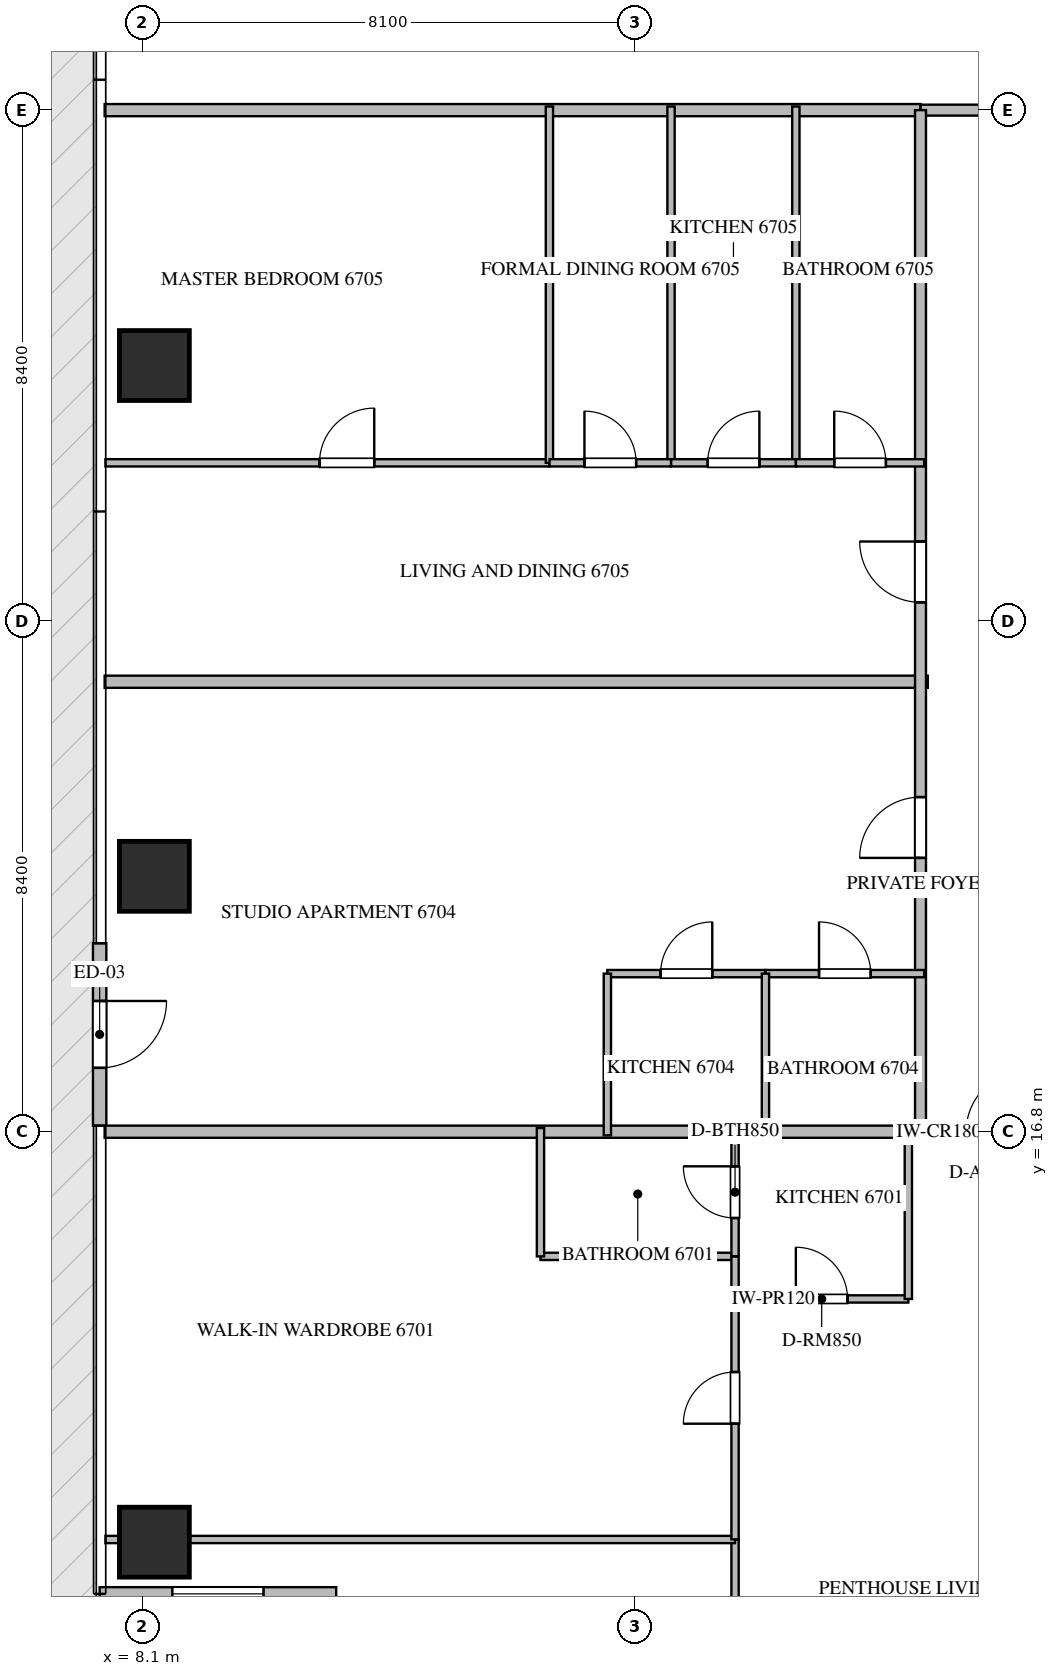
"""IFC4 building model, lengths in metres.
Left out: names, types, materials, properties, quantities, classifications, styles, units other than length and angle.
Written with IfcOpenShell. Run it as: python <this file> out.ifc"""

import sys

from ifc_helpers import new_model, si_unit, direction, frame, frame_2d, origin, origin_2d, place, context, subcontext, project, spatial, rectangle, extrude, source, transform, mapped, element, fill, save


model = new_model("IFC4")
c1 = context("Model", 3, precision=1e-05, world=origin(), true_north=direction((0.0, 1.0)))
c2 = subcontext(c1, "Body", "Model", "MODEL_VIEW")
j1 = project(units=[si_unit("LENGTHUNIT", "METRE"), si_unit("PLANEANGLEUNIT", "RADIAN")], contexts=[c1])
p1 = place(None, origin())
s1 = spatial("IfcSite", under=j1, at=p1, CompositionType="ELEMENT")
p2 = place(p1, origin())
s2 = spatial("IfcBuilding", under=s1, at=p2, CompositionType="ELEMENT")
p3 = place(p2, frame((0.0, 0.0, 268.2)))
s3 = spatial("IfcBuildingStorey", under=s2, at=p3, CompositionType="ELEMENT", Elevation=268.2)
m1 = source(origin(), c2, "Body", "SweptSolid", [
    extrude(rectangle(XDim=1.15, YDim=1.15, at=origin_2d()), origin(), (0.0, 0.0, 1.0), 3.85),
])
for number, where, z_axis, x_axis in (
    (1, (8.3, 10.05, -0.26), (0.0, 0.0, 1.0), (1.0, 0.0, 0.0)),
    (2, (8.3, 21.0, -0.26), (0.0, 0.0, 1.0), (1.0, 0.0, 0.0)),
    (3, (8.3, 29.4, -0.26), (0.0, 0.0, 1.0), (1.0, 0.0, 0.0)),
):
    element("IfcColumn", number, at=place(p3, frame(where, z_axis=z_axis, x_axis=x_axis)), inside=s3, PredefinedType="COLUMN", context=c2, shape_type="MappedRepresentation", body=[
        mapped(m1, transform((0.0, 0.0, 0.0), scale=1.0)),
    ])
p4 = place(p3, frame((7.4, 19.9, 0.0), z_axis=(0.0, 0.0, 1.0), x_axis=(0.0, -1.0, 0.0)))
e4 = element("IfcWall", 4, at=p4, inside=s3, PredefinedType="ELEMENTEDWALL", context=c2, shape_type="SweptSolid", body=[
    extrude(rectangle(XDim=3.0, YDim=0.22, at=frame_2d((1.5, 0.0))), origin(), (0.0, 0.0, 1.0), 3.575),
])
p5 = place(p4, frame((0.95, 0.0, 0.0)))
e5 = element("IfcOpeningElement", 5, at=p5, cuts=e4, PredefinedType="OPENING", context=c2, shape_type="SweptSolid", body=[
    extrude(rectangle(XDim=1.1, YDim=2.2, at=frame_2d((0.55, 1.1))), frame((0.0, 0.12, 0.0), z_axis=(0.0, -1.0, 0.0), x_axis=(1.0, 0.0, 0.0)), (0.0, 0.0, 1.0), 0.24),
])
p6 = place(p3, frame((7.4, 9.2, 0.0), z_axis=(0.0, 0.0, 1.0), x_axis=(1.0, 0.0, 0.0)))
e6 = element("IfcWall", 6, at=p6, inside=s3, PredefinedType="ELEMENTEDWALL", context=c2, shape_type="SweptSolid", body=[
    extrude(rectangle(XDim=3.89, YDim=0.22, at=frame_2d((1.945, 0.0))), origin(), (0.0, 0.0, 1.0), 3.575),
])
p7 = place(p6, frame((1.195, 0.0, 0.65)))
e7 = element("IfcOpeningElement", 7, at=p7, cuts=e6, PredefinedType="OPENING", context=c2, shape_type="SweptSolid", body=[
    extrude(rectangle(XDim=1.5, YDim=2.25, at=frame_2d((0.75, 1.125))), frame((0.0, 0.12, 0.0), z_axis=(0.0, -1.0, 0.0), x_axis=(1.0, 0.0, 0.0)), (0.0, 0.0, 1.0), 0.24),
])
p8 = place(p3, frame((7.482, 24.2, 0.0), z_axis=(0.0, 0.0, 1.0), x_axis=(1.0, 0.0, 0.0)))
e8 = element("IfcWall", 8, at=p8, inside=s3, PredefinedType="PARTITIONING", context=c2, shape_type="SweptSolid", body=[
    extrude(rectangle(XDim=13.538, YDim=0.2, at=frame_2d((6.769, 0.0))), origin(), (0.0, 0.0, 1.0), 3.59),
])
for number, where, z_axis, x_axis in (
    (9, (7.482, 16.8, 0.0), (0.0, 0.0, 1.0), (1.0, 0.0, 0.0)),
    (10, (7.482, 33.6, 0.0), (0.0, 0.0, 1.0), (1.0, 0.0, 0.0)),
):
    element("IfcWall", number, at=place(p3, frame(where, z_axis=z_axis, x_axis=x_axis)), inside=s3, PredefinedType="PARTITIONING", context=c2, shape_type="SweptSolid", body=[
        extrude(rectangle(XDim=13.418, YDim=0.2, at=frame_2d((6.709, 0.0))), origin(), (0.0, 0.0, 1.0), 3.59),
    ])
p9 = place(p3, frame((20.902, 16.8, 0.0), z_axis=(0.0, 0.0, 1.0), x_axis=(1.0, 0.0, 0.0)))
e11 = element("IfcWall", 11, at=p9, inside=s3, PredefinedType="PARTITIONING", context=c2, shape_type="SweptSolid", body=[
    extrude(rectangle(XDim=2.496, YDim=0.18, at=frame_2d((1.248, 0.0))), origin(), (0.0, 0.0, 1.0), 3.59),
])
p10 = place(p9, frame((0.748, 0.0, 0.0)))
e12 = element("IfcOpeningElement", 12, at=p10, cuts=e11, PredefinedType="OPENING", context=c2, shape_type="SweptSolid", body=[
    extrude(rectangle(XDim=1.0, YDim=2.15, at=frame_2d((0.5, 1.075))), frame((0.0, 0.1, 0.0), z_axis=(0.0, -1.0, 0.0), x_axis=(1.0, 0.0, 0.0)), (0.0, 0.0, 1.0), 0.2),
])
p11 = place(p3, frame((20.902, 33.6, 0.0), z_axis=(0.0, 0.0, 1.0), x_axis=(1.0, 0.0, 0.0)))
e13 = element("IfcWall", 13, at=p11, inside=s3, PredefinedType="PARTITIONING", context=c2, shape_type="SweptSolid", body=[
    extrude(rectangle(XDim=2.496, YDim=0.18, at=frame_2d((1.248, 0.0))), origin(), (0.0, 0.0, 1.0), 3.59),
])
p12 = place(p3, frame((20.9, 16.8, 0.0), z_axis=(0.0, 0.0, 1.0), x_axis=(0.0, 1.0, 0.0)))
e14 = element("IfcWall", 14, at=p12, inside=s3, PredefinedType="PARTITIONING", context=c2, shape_type="SweptSolid", body=[
    extrude(rectangle(XDim=16.8, YDim=0.18, at=frame_2d((8.4, 0.0))), origin(), (0.0, 0.0, 1.0), 3.59),
])
p13 = place(p12, frame((4.503, 0.0, 0.0)))
e15 = element("IfcOpeningElement", 15, at=p13, cuts=e14, PredefinedType="OPENING", context=c2, shape_type="SweptSolid", body=[
    extrude(rectangle(XDim=1.0, YDim=2.15, at=frame_2d((0.5, 1.075))), frame((0.0, 0.1, 0.0), z_axis=(0.0, -1.0, 0.0), x_axis=(1.0, 0.0, 0.0)), (0.0, 0.0, 1.0), 0.2),
])
p14 = place(p12, frame((8.706, 0.0, 0.0)))
e16 = element("IfcOpeningElement", 16, at=p14, cuts=e14, PredefinedType="OPENING", context=c2, shape_type="SweptSolid", body=[
    extrude(rectangle(XDim=1.0, YDim=2.15, at=frame_2d((0.5, 1.075))), frame((0.0, 0.1, 0.0), z_axis=(0.0, -1.0, 0.0), x_axis=(1.0, 0.0, 0.0)), (0.0, 0.0, 1.0), 0.2),
])
p15 = place(p3, frame((17.85, 14.05, 0.0), z_axis=(0.0, 0.0, 1.0), x_axis=(1.0, 0.0, 0.0)))
e17 = element("IfcWall", 17, at=p15, inside=s3, PredefinedType="PARTITIONING", context=c2, shape_type="SweptSolid", body=[
    extrude(rectangle(XDim=2.85, YDim=0.12, at=frame_2d((1.425, 0.0))), origin(), (0.0, 0.0, 1.0), 3.59),
])
p16 = place(p15, frame((1.0, 0.0, 0.0)))
e18 = element("IfcOpeningElement", 18, at=p16, cuts=e17, PredefinedType="OPENING", context=c2, shape_type="SweptSolid", body=[
    extrude(rectangle(XDim=0.85, YDim=2.1, at=frame_2d((0.425, 1.05))), frame((0.0, 0.07, 0.0), z_axis=(0.0, -1.0, 0.0), x_axis=(1.0, 0.0, 0.0)), (0.0, 0.0, 1.0), 0.14),
])
p17 = place(p3, frame((20.7, 14.05, 0.0), z_axis=(0.0, 0.0, 1.0), x_axis=(0.0, 1.0, 0.0)))
e19 = element("IfcWall", 19, at=p17, inside=s3, PredefinedType="PARTITIONING", context=c2, shape_type="SweptSolid", body=[
    extrude(rectangle(XDim=2.81, YDim=0.12, at=frame_2d((1.405, 0.0))), origin(), (0.0, 0.0, 1.0), 3.59),
])
p18 = place(p3, frame((17.85, 1.295, 0.0), z_axis=(0.0, 0.0, 1.0), x_axis=(0.0, 1.0, 0.0)))
e20 = element("IfcWall", 20, at=p18, inside=s3, PredefinedType="PARTITIONING", context=c2, shape_type="SweptSolid", body=[
    extrude(rectangle(XDim=8.799, YDim=0.12, at=frame_2d((4.399, 0.0))), origin(), (0.0, 0.0, 1.0), 3.59),
])
p19 = place(p18, frame((4.344, 0.0, 0.0)))
e21 = element("IfcOpeningElement", 21, at=p19, cuts=e20, PredefinedType="OPENING", context=c2, shape_type="SweptSolid", body=[
    extrude(rectangle(XDim=0.9, YDim=2.1, at=frame_2d((0.45, 1.05))), frame((0.0, 0.07, 0.0), z_axis=(0.0, -1.0, 0.0), x_axis=(1.0, 0.0, 0.0)), (0.0, 0.0, 1.0), 0.14),
])
p20 = place(p3, frame((7.495, 10.094, 0.0), z_axis=(0.0, 0.0, 1.0), x_axis=(1.0, 0.0, 0.0)))
e22 = element("IfcWall", 22, at=p20, inside=s3, PredefinedType="PARTITIONING", context=c2, shape_type="SweptSolid", body=[
    extrude(rectangle(XDim=10.355, YDim=0.12, at=frame_2d((5.177, 0.0))), origin(), (0.0, 0.0, 1.0), 3.122),
])
p21 = place(p3, frame((14.65, 14.75, 0.0), z_axis=(0.0, 0.0, 1.0), x_axis=(1.0, 0.0, 0.0)))
e23 = element("IfcWall", 23, at=p21, inside=s3, PredefinedType="PARTITIONING", context=c2, shape_type="SweptSolid", body=[
    extrude(rectangle(XDim=3.2, YDim=0.12, at=frame_2d((1.6, 0.0))), origin(), (0.0, 0.0, 1.0), 3.59),
])
p22 = place(p3, frame((14.65, 14.75, 0.0), z_axis=(0.0, 0.0, 1.0), x_axis=(0.0, 1.0, 0.0)))
e24 = element("IfcWall", 24, at=p22, inside=s3, PredefinedType="PARTITIONING", context=c2, shape_type="SweptSolid", body=[
    extrude(rectangle(XDim=2.11, YDim=0.12, at=frame_2d((1.055, 0.0))), origin(), (0.0, 0.0, 1.0), 3.59),
])
p23 = place(p3, frame((17.85, 10.096, 0.0), z_axis=(0.0, 0.0, 1.0), x_axis=(0.0, 1.0, 0.0)))
e25 = element("IfcWall", 25, at=p23, inside=s3, PredefinedType="PARTITIONING", context=c2, shape_type="SweptSolid", body=[
    extrude(rectangle(XDim=4.654, YDim=0.12, at=frame_2d((2.327, 0.0))), origin(), (0.0, 0.0, 1.0), 3.59),
])
p24 = place(p23, frame((1.902, 0.0, 0.0)))
e26 = element("IfcOpeningElement", 26, at=p24, cuts=e25, PredefinedType="OPENING", context=c2, shape_type="SweptSolid", body=[
    extrude(rectangle(XDim=0.85, YDim=2.1, at=frame_2d((0.425, 1.05))), frame((0.0, 0.07, 0.0), z_axis=(0.0, -1.0, 0.0), x_axis=(1.0, 0.0, 0.0)), (0.0, 0.0, 1.0), 0.14),
])
p25 = place(p3, frame((17.85, 14.752, 0.0), z_axis=(0.0, 0.0, 1.0), x_axis=(0.0, 1.0, 0.0)))
e27 = element("IfcWall", 27, at=p25, inside=s3, PredefinedType="PARTITIONING", context=c2, shape_type="SweptSolid", body=[
    extrude(rectangle(XDim=2.108, YDim=0.12, at=frame_2d((1.054, 0.0))), origin(), (0.0, 0.0, 1.0), 3.59),
])
p26 = place(p25, frame((0.629, 0.0, 0.0)))
e28 = element("IfcOpeningElement", 28, at=p26, cuts=e27, PredefinedType="OPENING", context=c2, shape_type="SweptSolid", body=[
    extrude(rectangle(XDim=0.85, YDim=2.1, at=frame_2d((0.425, 1.05))), frame((0.0, 0.07, 0.0), z_axis=(0.0, -1.0, 0.0), x_axis=(1.0, 0.0, 0.0)), (0.0, 0.0, 1.0), 0.14),
])
p27 = place(p3, frame((15.75, 19.4, 0.0), z_axis=(0.0, 0.0, 1.0), x_axis=(1.0, 0.0, 0.0)))
e29 = element("IfcWall", 29, at=p27, inside=s3, PredefinedType="PARTITIONING", context=c2, shape_type="SweptSolid", body=[
    extrude(rectangle(XDim=2.6, YDim=0.12, at=frame_2d((1.3, 0.0))), origin(), (0.0, 0.0, 1.0), 3.59),
])
p28 = place(p27, frame((0.875, 0.0, 0.0)))
e30 = element("IfcOpeningElement", 30, at=p28, cuts=e29, PredefinedType="OPENING", context=c2, shape_type="SweptSolid", body=[
    extrude(rectangle(XDim=0.85, YDim=2.1, at=frame_2d((0.425, 1.05))), frame((0.0, 0.07, 0.0), z_axis=(0.0, -1.0, 0.0), x_axis=(1.0, 0.0, 0.0)), (0.0, 0.0, 1.0), 0.14),
])
p29 = place(p3, frame((18.352, 19.4, 0.0), z_axis=(0.0, 0.0, 1.0), x_axis=(1.0, 0.0, 0.0)))
e31 = element("IfcWall", 31, at=p29, inside=s3, PredefinedType="PARTITIONING", context=c2, shape_type="SweptSolid", body=[
    extrude(rectangle(XDim=2.608, YDim=0.12, at=frame_2d((1.304, 0.0))), origin(), (0.0, 0.0, 1.0), 3.59),
])
p30 = place(p29, frame((0.879, 0.0, 0.0)))
e32 = element("IfcOpeningElement", 32, at=p30, cuts=e31, PredefinedType="OPENING", context=c2, shape_type="SweptSolid", body=[
    extrude(rectangle(XDim=0.85, YDim=2.1, at=frame_2d((0.425, 1.05))), frame((0.0, 0.07, 0.0), z_axis=(0.0, -1.0, 0.0), x_axis=(1.0, 0.0, 0.0)), (0.0, 0.0, 1.0), 0.14),
])
for number, where, z_axis, x_axis in (
    (33, (18.35, 16.74, 0.0), (0.0, 0.0, 1.0), (0.0, 1.0, 0.0)),
    (34, (15.75, 16.74, 0.0), (0.0, 0.0, 1.0), (0.0, 1.0, 0.0)),
):
    element("IfcWall", number, at=place(p3, frame(where, z_axis=z_axis, x_axis=x_axis)), inside=s3, PredefinedType="PARTITIONING", context=c2, shape_type="SweptSolid", body=[
        extrude(rectangle(XDim=2.66, YDim=0.12, at=frame_2d((1.33, 0.0))), origin(), (0.0, 0.0, 1.0), 3.59),
    ])
p31 = place(p3, frame((7.495, 27.8, 0.0), z_axis=(0.0, 0.0, 1.0), x_axis=(1.0, 0.0, 0.0)))
e35 = element("IfcWall", 35, at=p31, inside=s3, PredefinedType="PARTITIONING", context=c2, shape_type="SweptSolid", body=[
    extrude(rectangle(XDim=7.302, YDim=0.12, at=frame_2d((3.651, 0.0))), origin(), (0.0, 0.0, 1.0), 3.59),
])
p32 = place(p31, frame((3.521, 0.0, 0.0)))
e36 = element("IfcOpeningElement", 36, at=p32, cuts=e35, PredefinedType="OPENING", context=c2, shape_type="SweptSolid", body=[
    extrude(rectangle(XDim=0.9, YDim=2.1, at=frame_2d((0.45, 1.05))), frame((0.0, 0.07, 0.0), z_axis=(0.0, -1.0, 0.0), x_axis=(1.0, 0.0, 0.0)), (0.0, 0.0, 1.0), 0.14),
])
for number, where, z_axis, x_axis in (
    (37, (14.797, 27.8, 0.0), (0.0, 0.0, 1.0), (0.0, 1.0, 0.0)),
    (38, (16.797, 27.8, 0.0), (0.0, 0.0, 1.0), (0.0, 1.0, 0.0)),
    (39, (18.85, 27.8, 0.0), (0.0, 0.0, 1.0), (0.0, 1.0, 0.0)),
):
    element("IfcWall", number, at=place(p3, frame(where, z_axis=z_axis, x_axis=x_axis)), inside=s3, PredefinedType="PARTITIONING", context=c2, shape_type="SweptSolid", body=[
        extrude(rectangle(XDim=5.86, YDim=0.12, at=frame_2d((2.93, 0.0))), origin(), (0.0, 0.0, 1.0), 3.59),
    ])
p33 = place(p3, frame((14.799, 27.8, 0.0), z_axis=(0.0, 0.0, 1.0), x_axis=(1.0, 0.0, 0.0)))
e40 = element("IfcWall", 40, at=p33, inside=s3, PredefinedType="PARTITIONING", context=c2, shape_type="SweptSolid", body=[
    extrude(rectangle(XDim=1.998, YDim=0.12, at=frame_2d((0.999, 0.0))), origin(), (0.0, 0.0, 1.0), 3.59),
])
p34 = place(p33, frame((0.574, 0.0, 0.0)))
e41 = element("IfcOpeningElement", 41, at=p34, cuts=e40, PredefinedType="OPENING", context=c2, shape_type="SweptSolid", body=[
    extrude(rectangle(XDim=0.85, YDim=2.1, at=frame_2d((0.425, 1.05))), frame((0.0, 0.07, 0.0), z_axis=(0.0, -1.0, 0.0), x_axis=(1.0, 0.0, 0.0)), (0.0, 0.0, 1.0), 0.14),
])
p35 = place(p3, frame((16.799, 27.8, 0.0), z_axis=(0.0, 0.0, 1.0), x_axis=(1.0, 0.0, 0.0)))
e42 = element("IfcWall", 42, at=p35, inside=s3, PredefinedType="PARTITIONING", context=c2, shape_type="SweptSolid", body=[
    extrude(rectangle(XDim=2.051, YDim=0.12, at=frame_2d((1.025, 0.0))), origin(), (0.0, 0.0, 1.0), 3.59),
])
p36 = place(p35, frame((0.601, 0.0, 0.0)))
e43 = element("IfcOpeningElement", 43, at=p36, cuts=e42, PredefinedType="OPENING", context=c2, shape_type="SweptSolid", body=[
    extrude(rectangle(XDim=0.85, YDim=2.1, at=frame_2d((0.425, 1.05))), frame((0.0, 0.07, 0.0), z_axis=(0.0, -1.0, 0.0), x_axis=(1.0, 0.0, 0.0)), (0.0, 0.0, 1.0), 0.14),
])
p37 = place(p3, frame((18.852, 27.8, 0.0), z_axis=(0.0, 0.0, 1.0), x_axis=(1.0, 0.0, 0.0)))
e44 = element("IfcWall", 44, at=p37, inside=s3, PredefinedType="PARTITIONING", context=c2, shape_type="SweptSolid", body=[
    extrude(rectangle(XDim=2.108, YDim=0.12, at=frame_2d((1.054, 0.0))), origin(), (0.0, 0.0, 1.0), 3.59),
])
p38 = place(p37, frame((0.629, 0.0, 0.0)))
e45 = element("IfcOpeningElement", 45, at=p38, cuts=e44, PredefinedType="OPENING", context=c2, shape_type="SweptSolid", body=[
    extrude(rectangle(XDim=0.85, YDim=2.1, at=frame_2d((0.425, 1.05))), frame((0.0, 0.07, 0.0), z_axis=(0.0, -1.0, 0.0), x_axis=(1.0, 0.0, 0.0)), (0.0, 0.0, 1.0), 0.14),
])
m2 = source(origin(), c2, "Body", "SweptSolid", [
    extrude(rectangle(XDim=1.1, YDim=2.2, at=frame_2d((0.55, 1.1))), frame((0.0, 0.025, 0.0), z_axis=(0.0, -1.0, 0.0), x_axis=(1.0, 0.0, 0.0)), (0.0, 0.0, 1.0), 0.05),
])
p39 = place(p5, origin())
e46 = element("IfcDoor", 46, at=p39, inside=s3, OperationType="SINGLE_SWING_LEFT", PredefinedType="DOOR", context=c2, shape_type="MappedRepresentation", body=[
    mapped(m2, transform((0.0, 0.0, 0.0), scale=1.0)),
])
fill(e5, e46)
m3 = source(origin(), c2, "Body", "SweptSolid", [
    extrude(rectangle(XDim=1.5, YDim=2.25, at=frame_2d((0.75, 1.125))), frame((0.0, 0.03, 0.0), z_axis=(0.0, -1.0, 0.0), x_axis=(1.0, 0.0, 0.0)), (0.0, 0.0, 1.0), 0.06),
])
p40 = place(p7, origin())
e47 = element("IfcWindow", 47, at=p40, inside=s3, PartitioningType="SINGLE_PANEL", PredefinedType="WINDOW", context=c2, shape_type="MappedRepresentation", body=[
    mapped(m3, transform((0.0, 0.0, 0.0), scale=1.0)),
])
fill(e7, e47)
m4 = source(origin(), c2, "Body", "SweptSolid", [
    extrude(rectangle(XDim=1.0, YDim=2.15, at=frame_2d((0.5, 1.075))), frame((0.0, 0.025, 0.0), z_axis=(0.0, -1.0, 0.0), x_axis=(1.0, 0.0, 0.0)), (0.0, 0.0, 1.0), 0.05),
])
p41 = place(p10, origin())
e48 = element("IfcDoor", 48, at=p41, inside=s3, OperationType="SINGLE_SWING_RIGHT", PredefinedType="DOOR", context=c2, shape_type="MappedRepresentation", body=[
    mapped(m4, transform((0.0, 0.0, 0.0), scale=1.0)),
])
fill(e12, e48)
p42 = place(p13, origin())
e49 = element("IfcDoor", 49, at=p42, inside=s3, OperationType="SINGLE_SWING_LEFT", PredefinedType="DOOR", context=c2, shape_type="MappedRepresentation", body=[
    mapped(m4, transform((0.0, 0.0, 0.0), scale=1.0)),
])
fill(e15, e49)
p43 = place(p14, origin())
e50 = element("IfcDoor", 50, at=p43, inside=s3, OperationType="SINGLE_SWING_RIGHT", PredefinedType="DOOR", context=c2, shape_type="MappedRepresentation", body=[
    mapped(m4, transform((0.0, 0.0, 0.0), scale=1.0)),
])
fill(e16, e50)
m5 = source(origin(), c2, "Body", "SweptSolid", [
    extrude(rectangle(XDim=0.85, YDim=2.1, at=frame_2d((0.425, 1.05))), frame((0.0, 0.025, 0.0), z_axis=(0.0, -1.0, 0.0), x_axis=(1.0, 0.0, 0.0)), (0.0, 0.0, 1.0), 0.05),
])
p44 = place(p16, origin())
e51 = element("IfcDoor", 51, at=p44, inside=s3, OperationType="SINGLE_SWING_LEFT", PredefinedType="DOOR", context=c2, shape_type="MappedRepresentation", body=[
    mapped(m5, transform((0.0, 0.0, 0.0), scale=1.0)),
])
fill(e18, e51)
p45 = place(p24, origin())
e52 = element("IfcDoor", 52, at=p45, inside=s3, OperationType="SINGLE_SWING_LEFT", PredefinedType="DOOR", context=c2, shape_type="MappedRepresentation", body=[
    mapped(m5, transform((0.0, 0.0, 0.0), scale=1.0)),
])
fill(e26, e52)
p46 = place(p26, origin())
e53 = element("IfcDoor", 53, at=p46, inside=s3, OperationType="SINGLE_SWING_RIGHT", PredefinedType="DOOR", context=c2, shape_type="MappedRepresentation", body=[
    mapped(m5, transform((0.0, 0.0, 0.0), scale=1.0)),
])
fill(e28, e53)
p47 = place(p28, origin())
e54 = element("IfcDoor", 54, at=p47, inside=s3, OperationType="SINGLE_SWING_RIGHT", PredefinedType="DOOR", context=c2, shape_type="MappedRepresentation", body=[
    mapped(m5, transform((0.0, 0.0, 0.0), scale=1.0)),
])
fill(e30, e54)
p48 = place(p30, origin())
e55 = element("IfcDoor", 55, at=p48, inside=s3, OperationType="SINGLE_SWING_LEFT", PredefinedType="DOOR", context=c2, shape_type="MappedRepresentation", body=[
    mapped(m5, transform((0.0, 0.0, 0.0), scale=1.0)),
])
fill(e32, e55)
m6 = source(origin(), c2, "Body", "SweptSolid", [
    extrude(rectangle(XDim=0.9, YDim=2.1, at=frame_2d((0.45, 1.05))), frame((0.0, 0.025, 0.0), z_axis=(0.0, -1.0, 0.0), x_axis=(1.0, 0.0, 0.0)), (0.0, 0.0, 1.0), 0.05),
])
p49 = place(p32, origin())
e56 = element("IfcDoor", 56, at=p49, inside=s3, OperationType="SINGLE_SWING_RIGHT", PredefinedType="DOOR", context=c2, shape_type="MappedRepresentation", body=[
    mapped(m6, transform((0.0, 0.0, 0.0), scale=1.0)),
])
fill(e36, e56)
p50 = place(p34, origin())
e57 = element("IfcDoor", 57, at=p50, inside=s3, OperationType="SINGLE_SWING_LEFT", PredefinedType="DOOR", context=c2, shape_type="MappedRepresentation", body=[
    mapped(m5, transform((0.0, 0.0, 0.0), scale=1.0)),
])
fill(e41, e57)
p51 = place(p36, origin())
e58 = element("IfcDoor", 58, at=p51, inside=s3, OperationType="SINGLE_SWING_RIGHT", PredefinedType="DOOR", context=c2, shape_type="MappedRepresentation", body=[
    mapped(m5, transform((0.0, 0.0, 0.0), scale=1.0)),
])
fill(e43, e58)
p52 = place(p38, origin())
e59 = element("IfcDoor", 59, at=p52, inside=s3, OperationType="SINGLE_SWING_LEFT", PredefinedType="DOOR", context=c2, shape_type="MappedRepresentation", body=[
    mapped(m5, transform((0.0, 0.0, 0.0), scale=1.0)),
])
fill(e45, e59)
save(model, sys.argv[1])
